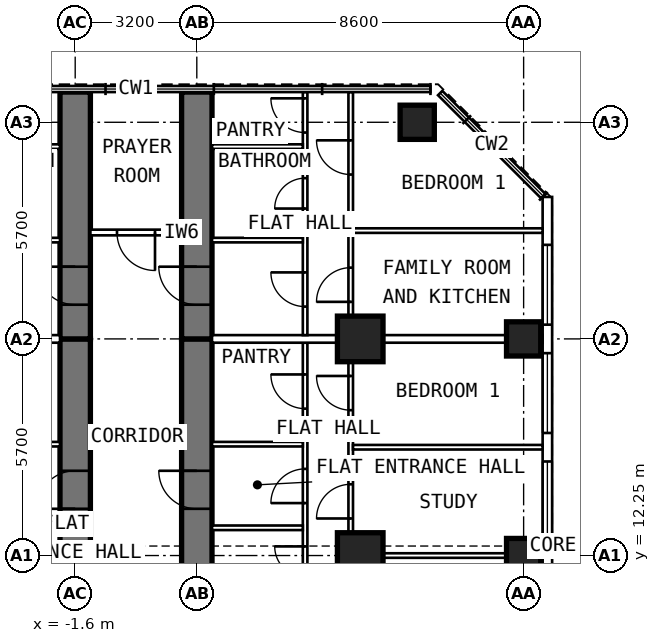
"""IFC4 building model, lengths in metres.
Left out: names, types, materials, properties, quantities, classifications, styles, units other than length and angle.
Written with IfcOpenShell. Run it as: python <this file> out.ifc"""

import sys

from ifc_helpers import new_model, si_unit, direction, frame, frame_2d, origin, origin_2d, place, context, subcontext, project, spatial, rectangle, extrude, element, fill, save


model = new_model("IFC4")
c1 = context("Model", 3, precision=1e-05, world=origin(), true_north=direction((0.0, 1.0)))
c2 = subcontext(c1, "Body", "Model", "MODEL_VIEW")
j1 = project(units=[si_unit("LENGTHUNIT", "METRE"), si_unit("PLANEANGLEUNIT", "RADIAN")], contexts=[c1])
p1 = place(None, origin())
s1 = spatial("IfcSite", under=j1, at=p1, CompositionType="ELEMENT")
p2 = place(p1, origin())
s2 = spatial("IfcBuilding", under=s1, at=p2, CompositionType="ELEMENT")
p3 = place(p2, frame((0.0, 0.0, 183.2)))
s3 = spatial("IfcBuildingStorey", under=s2, at=p3, CompositionType="ELEMENT", Elevation=183.2)
for number, where, z_axis, x_axis in (
    (1, (10.2, 12.25, 0.0), (0.0, 0.0, 1.0), (0.0, 1.0, 0.0)),
    (2, (10.2, 17.95, 0.0), (0.0, 0.0, 1.0), (0.0, 1.0, 0.0)),
    (3, (7.4, 23.65, 0.0), (0.0, 0.0, 1.0), (0.0, 1.0, 0.0)),
):
    element("IfcColumn", number, at=place(p3, frame(where, z_axis=z_axis, x_axis=x_axis)), inside=s3, PredefinedType="COLUMN", context=c2, shape_type="SweptSolid", body=[
        extrude(rectangle(XDim=0.9, YDim=0.9, at=origin_2d()), origin(), (0.0, 0.0, 1.0), 3.6),
    ])
for number, where, z_axis, x_axis in (
    (4, (5.9, 12.25, 0.0), (0.0, 0.0, 1.0), (0.0, 1.0, 0.0)),
    (5, (5.9, 17.95, 0.0), (0.0, 0.0, 1.0), (0.0, 1.0, 0.0)),
):
    element("IfcColumn", number, at=place(p3, frame(where, z_axis=z_axis, x_axis=x_axis)), inside=s3, PredefinedType="COLUMN", context=c2, shape_type="SweptSolid", body=[
        extrude(rectangle(XDim=1.2, YDim=1.2, at=origin_2d()), origin(), (0.0, 0.0, 1.0), 3.6),
    ])
p4 = place(p3, frame((-1.6, 9.6, 0.0), z_axis=(0.0, 0.0, 1.0), x_axis=(0.0, 1.0, 0.0)))
e6 = element("IfcWall", 6, at=p4, inside=s3, PredefinedType="SHEAR", context=c2, shape_type="SweptSolid", body=[
    extrude(rectangle(XDim=8.35, YDim=0.8, at=frame_2d((4.175, 0.0))), origin(), (0.0, 0.0, 1.0), 3.6),
])
p5 = place(p4, frame((3.88, 0.0, 0.0)))
e7 = element("IfcOpeningElement", 7, at=p5, cuts=e6, PredefinedType="OPENING", context=c2, shape_type="SweptSolid", body=[
    extrude(rectangle(XDim=1.0, YDim=2.1, at=frame_2d((0.5, 1.05))), frame((0.0, 0.412, 0.0), z_axis=(0.0, -1.0, 0.0), x_axis=(1.0, 0.0, 0.0)), (0.0, 0.0, 1.0), 0.824),
])
p6 = place(p3, frame((-1.6, 17.95, 0.0), z_axis=(0.0, 0.0, 1.0), x_axis=(0.0, 1.0, 0.0)))
e8 = element("IfcWall", 8, at=p6, inside=s3, PredefinedType="SHEAR", context=c2, shape_type="SweptSolid", body=[
    extrude(rectangle(XDim=6.495, YDim=0.8, at=frame_2d((3.248, 0.0))), origin(), (0.0, 0.0, 1.0), 3.6),
])
p7 = place(p6, frame((0.9, 0.0, 0.0)))
e9 = element("IfcOpeningElement", 9, at=p7, cuts=e8, PredefinedType="OPENING", context=c2, shape_type="SweptSolid", body=[
    extrude(rectangle(XDim=1.0, YDim=2.1, at=frame_2d((0.5, 1.05))), frame((0.0, 0.412, 0.0), z_axis=(0.0, -1.0, 0.0), x_axis=(1.0, 0.0, 0.0)), (0.0, 0.0, 1.0), 0.824),
])
p8 = place(p3, frame((1.6, 9.6, 0.0), z_axis=(0.0, 0.0, 1.0), x_axis=(0.0, 1.0, 0.0)))
e10 = element("IfcWall", 10, at=p8, inside=s3, PredefinedType="SHEAR", context=c2, shape_type="SweptSolid", body=[
    extrude(rectangle(XDim=8.35, YDim=0.8, at=frame_2d((4.175, 0.0))), origin(), (0.0, 0.0, 1.0), 3.6),
])
p9 = place(p8, frame((3.88, 0.0, 0.0)))
e11 = element("IfcOpeningElement", 11, at=p9, cuts=e10, PredefinedType="OPENING", context=c2, shape_type="SweptSolid", body=[
    extrude(rectangle(XDim=1.0, YDim=2.1, at=frame_2d((0.5, 1.05))), frame((0.0, 0.412, 0.0), z_axis=(0.0, -1.0, 0.0), x_axis=(1.0, 0.0, 0.0)), (0.0, 0.0, 1.0), 0.824),
])
p10 = place(p3, frame((1.6, 17.95, 0.0), z_axis=(0.0, 0.0, 1.0), x_axis=(0.0, 1.0, 0.0)))
e12 = element("IfcWall", 12, at=p10, inside=s3, PredefinedType="SHEAR", context=c2, shape_type="SweptSolid", body=[
    extrude(rectangle(XDim=6.495, YDim=0.8, at=frame_2d((3.248, 0.0))), origin(), (0.0, 0.0, 1.0), 3.6),
])
p11 = place(p10, frame((0.9, 0.0, 0.0)))
e13 = element("IfcOpeningElement", 13, at=p11, cuts=e12, PredefinedType="OPENING", context=c2, shape_type="SweptSolid", body=[
    extrude(rectangle(XDim=1.0, YDim=2.1, at=frame_2d((0.5, 1.05))), frame((0.0, 0.412, 0.0), z_axis=(0.0, -1.0, 0.0), x_axis=(1.0, 0.0, 0.0)), (0.0, 0.0, 1.0), 0.824),
])
p12 = place(p3, frame((10.825, 6.409, 0.0), z_axis=(0.0, 0.0, 1.0), x_axis=(0.0, 1.0, 0.0)))
e14 = element("IfcWall", 14, at=p12, inside=s3, PredefinedType="SOLIDWALL", context=c2, shape_type="SweptSolid", body=[
    extrude(rectangle(XDim=15.276, YDim=0.25, at=frame_2d((7.638, 0.0))), origin(), (0.0, 0.0, 1.0), 3.3),
])
p13 = place(p12, frame((0.516, 0.0, 0.8)))
e15 = element("IfcOpeningElement", 15, at=p13, cuts=e14, PredefinedType="OPENING", context=c2, shape_type="SweptSolid", body=[
    extrude(rectangle(XDim=2.1, YDim=1.8, at=frame_2d((1.05, 0.9))), frame((0.0, 0.137, 0.0), z_axis=(0.0, -1.0, 0.0), x_axis=(1.0, 0.0, 0.0)), (0.0, 0.0, 1.0), 0.274),
])
p14 = place(p12, frame((3.366, 0.0, 0.8)))
e16 = element("IfcOpeningElement", 16, at=p14, cuts=e14, PredefinedType="OPENING", context=c2, shape_type="SweptSolid", body=[
    extrude(rectangle(XDim=2.1, YDim=1.8, at=frame_2d((1.05, 0.9))), frame((0.0, 0.137, 0.0), z_axis=(0.0, -1.0, 0.0), x_axis=(1.0, 0.0, 0.0)), (0.0, 0.0, 1.0), 0.274),
])
p15 = place(p12, frame((6.216, 0.0, 0.8)))
e17 = element("IfcOpeningElement", 17, at=p15, cuts=e14, PredefinedType="OPENING", context=c2, shape_type="SweptSolid", body=[
    extrude(rectangle(XDim=2.1, YDim=1.8, at=frame_2d((1.05, 0.9))), frame((0.0, 0.137, 0.0), z_axis=(0.0, -1.0, 0.0), x_axis=(1.0, 0.0, 0.0)), (0.0, 0.0, 1.0), 0.274),
])
p16 = place(p12, frame((9.066, 0.0, 0.8)))
e18 = element("IfcOpeningElement", 18, at=p16, cuts=e14, PredefinedType="OPENING", context=c2, shape_type="SweptSolid", body=[
    extrude(rectangle(XDim=2.1, YDim=1.8, at=frame_2d((1.05, 0.9))), frame((0.0, 0.137, 0.0), z_axis=(0.0, -1.0, 0.0), x_axis=(1.0, 0.0, 0.0)), (0.0, 0.0, 1.0), 0.274),
])
p17 = place(p12, frame((11.916, 0.0, 0.8)))
e19 = element("IfcOpeningElement", 19, at=p17, cuts=e14, PredefinedType="OPENING", context=c2, shape_type="SweptSolid", body=[
    extrude(rectangle(XDim=2.1, YDim=1.8, at=frame_2d((1.05, 0.9))), frame((0.0, 0.137, 0.0), z_axis=(0.0, -1.0, 0.0), x_axis=(1.0, 0.0, 0.0)), (0.0, 0.0, 1.0), 0.274),
])
for number, where, z_axis, x_axis in (
    (20, (-2.0, 12.98, 0.0), (0.0, 0.0, 1.0), (-1.0, 0.0, 0.0)),
    (21, (-2.0, 15.18, 0.0), (0.0, 0.0, 1.0), (-1.0, 0.0, 0.0)),
    (22, (-2.0, 20.55, 0.0), (0.0, 0.0, 1.0), (-1.0, 0.0, 0.0)),
    (23, (-2.0, 23.01, 0.0), (0.0, 0.0, 1.0), (-1.0, 0.0, 0.0)),
):
    element("IfcWall", number, at=place(p3, frame(where, z_axis=z_axis, x_axis=x_axis)), inside=s3, PredefinedType="PARTITIONING", context=c2, shape_type="SweptSolid", body=[
        extrude(rectangle(XDim=2.39, YDim=0.12, at=frame_2d((1.195, 0.0))), origin(), (0.0, 0.0, 1.0), 3.3),
    ])
p18 = place(p3, frame((-2.0, 17.95, 0.0), z_axis=(0.0, 0.0, 1.0), x_axis=(-1.0, 0.0, 0.0)))
e24 = element("IfcWall", 24, at=p18, inside=s3, PredefinedType="PARTITIONING", context=c2, shape_type="SweptSolid", body=[
    extrude(rectangle(XDim=8.7, YDim=0.2, at=frame_2d((4.35, 0.0))), origin(), (0.0, 0.0, 1.0), 3.3),
])
p19 = place(p3, frame((4.45, 10.05, 0.0), z_axis=(0.0, 0.0, 1.0), x_axis=(0.0, 1.0, 0.0)))
e25 = element("IfcWall", 25, at=p19, inside=s3, PredefinedType="PARTITIONING", context=c2, shape_type="SweptSolid", body=[
    extrude(rectangle(XDim=7.8, YDim=0.12, at=frame_2d((3.9, 0.0))), origin(), (0.0, 0.0, 1.0), 3.3),
])
p20 = place(p19, frame((1.64, 0.0, 0.0)))
e26 = element("IfcOpeningElement", 26, at=p20, cuts=e25, PredefinedType="OPENING", context=c2, shape_type="SweptSolid", body=[
    extrude(rectangle(XDim=0.8, YDim=2.1, at=frame_2d((0.4, 1.05))), frame((0.0, 0.072, 0.0), z_axis=(0.0, -1.0, 0.0), x_axis=(1.0, 0.0, 0.0)), (0.0, 0.0, 1.0), 0.144),
])
p21 = place(p19, frame((3.58, 0.0, 0.0)))
e27 = element("IfcOpeningElement", 27, at=p21, cuts=e25, PredefinedType="OPENING", context=c2, shape_type="SweptSolid", body=[
    extrude(rectangle(XDim=0.9, YDim=2.1, at=frame_2d((0.45, 1.05))), frame((0.0, 0.072, 0.0), z_axis=(0.0, -1.0, 0.0), x_axis=(1.0, 0.0, 0.0)), (0.0, 0.0, 1.0), 0.144),
])
p22 = place(p19, frame((6.065, 0.0, 0.0)))
e28 = element("IfcOpeningElement", 28, at=p22, cuts=e25, PredefinedType="OPENING", context=c2, shape_type="SweptSolid", body=[
    extrude(rectangle(XDim=0.9, YDim=2.1, at=frame_2d((0.45, 1.05))), frame((0.0, 0.072, 0.0), z_axis=(0.0, -1.0, 0.0), x_axis=(1.0, 0.0, 0.0)), (0.0, 0.0, 1.0), 0.144),
])
p23 = place(p3, frame((5.65, 9.6, 0.0), z_axis=(0.0, 0.0, 1.0), x_axis=(0.0, 1.0, 0.0)))
e29 = element("IfcWall", 29, at=p23, inside=s3, PredefinedType="PARTITIONING", context=c2, shape_type="SweptSolid", body=[
    extrude(rectangle(XDim=8.1, YDim=0.12, at=frame_2d((4.05, 0.0))), origin(), (0.0, 0.0, 1.0), 3.3),
])
p24 = place(p23, frame((1.0, 0.0, 0.0)))
e30 = element("IfcOpeningElement", 30, at=p24, cuts=e29, PredefinedType="OPENING", context=c2, shape_type="SweptSolid", body=[
    extrude(rectangle(XDim=0.9, YDim=2.1, at=frame_2d((0.45, 1.05))), frame((0.0, 0.072, 0.0), z_axis=(0.0, -1.0, 0.0), x_axis=(1.0, 0.0, 0.0)), (0.0, 0.0, 1.0), 0.144),
])
p25 = place(p23, frame((3.625, 0.0, 0.0)))
e31 = element("IfcOpeningElement", 31, at=p25, cuts=e29, PredefinedType="OPENING", context=c2, shape_type="SweptSolid", body=[
    extrude(rectangle(XDim=0.9, YDim=2.1, at=frame_2d((0.45, 1.05))), frame((0.0, 0.072, 0.0), z_axis=(0.0, -1.0, 0.0), x_axis=(1.0, 0.0, 0.0)), (0.0, 0.0, 1.0), 0.144),
])
p26 = place(p23, frame((6.475, 0.0, 0.0)))
e32 = element("IfcOpeningElement", 32, at=p26, cuts=e29, PredefinedType="OPENING", context=c2, shape_type="SweptSolid", body=[
    extrude(rectangle(XDim=0.9, YDim=2.1, at=frame_2d((0.45, 1.05))), frame((0.0, 0.072, 0.0), z_axis=(0.0, -1.0, 0.0), x_axis=(1.0, 0.0, 0.0)), (0.0, 0.0, 1.0), 0.144),
])
p27 = place(p3, frame((5.71, 12.25, 0.0), z_axis=(0.0, 0.0, 1.0), x_axis=(1.0, 0.0, 0.0)))
e33 = element("IfcWall", 33, at=p27, inside=s3, PredefinedType="PARTITIONING", context=c2, shape_type="SweptSolid", body=[
    extrude(rectangle(XDim=4.99, YDim=0.12, at=frame_2d((2.495, 0.0))), origin(), (0.0, 0.0, 1.0), 2.3),
])
p28 = place(p3, frame((5.71, 15.1, 0.0), z_axis=(0.0, 0.0, 1.0), x_axis=(1.0, 0.0, 0.0)))
e34 = element("IfcWall", 34, at=p28, inside=s3, PredefinedType="PARTITIONING", context=c2, shape_type="SweptSolid", body=[
    extrude(rectangle(XDim=4.99, YDim=0.12, at=frame_2d((2.495, 0.0))), origin(), (0.0, 0.0, 1.0), 3.3),
])
for number, where, z_axis, x_axis in (
    (35, (2.0, 12.98, 0.0), (0.0, 0.0, 1.0), (1.0, 0.0, 0.0)),
    (36, (2.0, 15.18, 0.0), (0.0, 0.0, 1.0), (1.0, 0.0, 0.0)),
):
    element("IfcWall", number, at=place(p3, frame(where, z_axis=z_axis, x_axis=x_axis)), inside=s3, PredefinedType="PARTITIONING", context=c2, shape_type="SweptSolid", body=[
        extrude(rectangle(XDim=2.39, YDim=0.12, at=frame_2d((1.195, 0.0))), origin(), (0.0, 0.0, 1.0), 3.3),
    ])
p29 = place(p3, frame((4.45, 18.05, 0.0), z_axis=(0.0, 0.0, 1.0), x_axis=(0.0, 1.0, 0.0)))
e37 = element("IfcWall", 37, at=p29, inside=s3, PredefinedType="PARTITIONING", context=c2, shape_type="SweptSolid", body=[
    extrude(rectangle(XDim=6.395, YDim=0.12, at=frame_2d((3.198, 0.0))), origin(), (0.0, 0.0, 1.0), 3.3),
])
p30 = place(p29, frame((0.75, 0.0, 0.0)))
e38 = element("IfcOpeningElement", 38, at=p30, cuts=e37, PredefinedType="OPENING", context=c2, shape_type="SweptSolid", body=[
    extrude(rectangle(XDim=0.9, YDim=2.1, at=frame_2d((0.45, 1.05))), frame((0.0, 0.072, 0.0), z_axis=(0.0, -1.0, 0.0), x_axis=(1.0, 0.0, 0.0)), (0.0, 0.0, 1.0), 0.144),
])
p31 = place(p29, frame((3.33, 0.0, 0.0)))
e39 = element("IfcOpeningElement", 39, at=p31, cuts=e37, PredefinedType="OPENING", context=c2, shape_type="SweptSolid", body=[
    extrude(rectangle(XDim=0.8, YDim=2.1, at=frame_2d((0.4, 1.05))), frame((0.0, 0.072, 0.0), z_axis=(0.0, -1.0, 0.0), x_axis=(1.0, 0.0, 0.0)), (0.0, 0.0, 1.0), 0.144),
])
p32 = place(p29, frame((5.33, 0.0, 0.0)))
e40 = element("IfcOpeningElement", 40, at=p32, cuts=e37, PredefinedType="OPENING", context=c2, shape_type="SweptSolid", body=[
    extrude(rectangle(XDim=0.9, YDim=2.1, at=frame_2d((0.45, 1.05))), frame((0.0, 0.072, 0.0), z_axis=(0.0, -1.0, 0.0), x_axis=(1.0, 0.0, 0.0)), (0.0, 0.0, 1.0), 0.144),
])
p33 = place(p3, frame((5.65, 18.05, 0.0), z_axis=(0.0, 0.0, 1.0), x_axis=(0.0, 1.0, 0.0)))
e41 = element("IfcWall", 41, at=p33, inside=s3, PredefinedType="PARTITIONING", context=c2, shape_type="SweptSolid", body=[
    extrude(rectangle(XDim=6.395, YDim=0.12, at=frame_2d((3.198, 0.0))), origin(), (0.0, 0.0, 1.0), 3.3),
])
p34 = place(p33, frame((0.875, 0.0, 0.0)))
e42 = element("IfcOpeningElement", 42, at=p34, cuts=e41, PredefinedType="OPENING", context=c2, shape_type="SweptSolid", body=[
    extrude(rectangle(XDim=0.9, YDim=2.1, at=frame_2d((0.45, 1.05))), frame((0.0, 0.072, 0.0), z_axis=(0.0, -1.0, 0.0), x_axis=(1.0, 0.0, 0.0)), (0.0, 0.0, 1.0), 0.144),
])
p35 = place(p33, frame((4.225, 0.0, 0.0)))
e43 = element("IfcOpeningElement", 43, at=p35, cuts=e41, PredefinedType="OPENING", context=c2, shape_type="SweptSolid", body=[
    extrude(rectangle(XDim=0.9, YDim=2.1, at=frame_2d((0.45, 1.05))), frame((0.0, 0.072, 0.0), z_axis=(0.0, -1.0, 0.0), x_axis=(1.0, 0.0, 0.0)), (0.0, 0.0, 1.0), 0.144),
])
p36 = place(p3, frame((5.71, 20.8, 0.0), z_axis=(0.0, 0.0, 1.0), x_axis=(1.0, 0.0, 0.0)))
e44 = element("IfcWall", 44, at=p36, inside=s3, PredefinedType="PARTITIONING", context=c2, shape_type="SweptSolid", body=[
    extrude(rectangle(XDim=4.99, YDim=0.12, at=frame_2d((2.495, 0.0))), origin(), (0.0, 0.0, 1.0), 3.3),
])
for number, where, z_axis, x_axis in (
    (45, (2.0, 20.55, 0.0), (0.0, 0.0, 1.0), (1.0, 0.0, 0.0)),
    (46, (2.0, 23.01, 0.0), (0.0, 0.0, 1.0), (1.0, 0.0, 0.0)),
):
    element("IfcWall", number, at=place(p3, frame(where, z_axis=z_axis, x_axis=x_axis)), inside=s3, PredefinedType="PARTITIONING", context=c2, shape_type="SweptSolid", body=[
        extrude(rectangle(XDim=2.39, YDim=0.12, at=frame_2d((1.195, 0.0))), origin(), (0.0, 0.0, 1.0), 3.3),
    ])
p37 = place(p3, frame((2.0, 17.95, 0.0), z_axis=(0.0, 0.0, 1.0), x_axis=(1.0, 0.0, 0.0)))
e47 = element("IfcWall", 47, at=p37, inside=s3, PredefinedType="PARTITIONING", context=c2, shape_type="SweptSolid", body=[
    extrude(rectangle(XDim=8.7, YDim=0.2, at=frame_2d((4.35, 0.0))), origin(), (0.0, 0.0, 1.0), 3.3),
])
p38 = place(p3, frame((1.2, 20.75, 0.0), z_axis=(0.0, 0.0, 1.0), x_axis=(-1.0, 0.0, 0.0)))
e48 = element("IfcWall", 48, at=p38, inside=s3, PredefinedType="PARTITIONING", context=c2, shape_type="SweptSolid", body=[
    extrude(rectangle(XDim=2.4, YDim=0.15, at=frame_2d((1.2, 0.0))), origin(), (0.0, 0.0, 1.0), 3.3),
])
p39 = place(p38, frame((0.7, 0.0, 0.0)))
e49 = element("IfcOpeningElement", 49, at=p39, cuts=e48, PredefinedType="OPENING", context=c2, shape_type="SweptSolid", body=[
    extrude(rectangle(XDim=1.0, YDim=2.1, at=frame_2d((0.5, 1.05))), frame((0.0, 0.087, 0.0), z_axis=(0.0, -1.0, 0.0), x_axis=(1.0, 0.0, 0.0)), (0.0, 0.0, 1.0), 0.174),
])
p40 = place(p15, origin())
e50 = element("IfcWindow", 50, at=p40, inside=s3, PartitioningType="SINGLE_PANEL", PredefinedType="WINDOW", context=c2, shape_type="SweptSolid", body=[
    extrude(rectangle(XDim=2.1, YDim=1.8, at=frame_2d((1.05, 0.9))), frame((0.0, 0.03, 0.0), z_axis=(0.0, -1.0, 0.0), x_axis=(1.0, 0.0, 0.0)), (0.0, 0.0, 1.0), 0.06),
])
fill(e17, e50)
p41 = place(p16, origin())
e51 = element("IfcWindow", 51, at=p41, inside=s3, PartitioningType="SINGLE_PANEL", PredefinedType="WINDOW", context=c2, shape_type="SweptSolid", body=[
    extrude(rectangle(XDim=2.1, YDim=1.8, at=frame_2d((1.05, 0.9))), frame((0.0, 0.03, 0.0), z_axis=(0.0, -1.0, 0.0), x_axis=(1.0, 0.0, 0.0)), (0.0, 0.0, 1.0), 0.06),
])
fill(e18, e51)
p42 = place(p17, origin())
e52 = element("IfcWindow", 52, at=p42, inside=s3, PartitioningType="SINGLE_PANEL", PredefinedType="WINDOW", context=c2, shape_type="SweptSolid", body=[
    extrude(rectangle(XDim=2.1, YDim=1.8, at=frame_2d((1.05, 0.9))), frame((0.0, 0.03, 0.0), z_axis=(0.0, -1.0, 0.0), x_axis=(1.0, 0.0, 0.0)), (0.0, 0.0, 1.0), 0.06),
])
fill(e19, e52)
p43 = place(p5, origin())
e53 = element("IfcDoor", 53, at=p43, inside=s3, OperationType="SINGLE_SWING_LEFT", PredefinedType="DOOR", context=c2, shape_type="SweptSolid", body=[
    extrude(rectangle(XDim=1.0, YDim=2.1, at=frame_2d((0.5, 1.05))), frame((0.0, 0.15, 0.0), z_axis=(0.0, -1.0, 0.0), x_axis=(1.0, 0.0, 0.0)), (0.0, 0.0, 1.0), 0.3),
])
fill(e7, e53)
p44 = place(p7, origin())
e54 = element("IfcDoor", 54, at=p44, inside=s3, OperationType="SINGLE_SWING_RIGHT", PredefinedType="DOOR", context=c2, shape_type="SweptSolid", body=[
    extrude(rectangle(XDim=1.0, YDim=2.1, at=frame_2d((0.5, 1.05))), frame((0.0, 0.15, 0.0), z_axis=(0.0, -1.0, 0.0), x_axis=(1.0, 0.0, 0.0)), (0.0, 0.0, 1.0), 0.3),
])
fill(e9, e54)
p45 = place(p9, origin())
e55 = element("IfcDoor", 55, at=p45, inside=s3, OperationType="SINGLE_SWING_RIGHT", PredefinedType="DOOR", context=c2, shape_type="SweptSolid", body=[
    extrude(rectangle(XDim=1.0, YDim=2.1, at=frame_2d((0.5, 1.05))), frame((0.0, 0.15, 0.0), z_axis=(0.0, -1.0, 0.0), x_axis=(1.0, 0.0, 0.0)), (0.0, 0.0, 1.0), 0.3),
])
fill(e11, e55)
p46 = place(p25, origin())
e56 = element("IfcDoor", 56, at=p46, inside=s3, OperationType="SINGLE_SWING_LEFT", PredefinedType="DOOR", context=c2, shape_type="SweptSolid", body=[
    extrude(rectangle(XDim=0.9, YDim=2.1, at=frame_2d((0.45, 1.05))), frame((0.0, 0.025, 0.0), z_axis=(0.0, -1.0, 0.0), x_axis=(1.0, 0.0, 0.0)), (0.0, 0.0, 1.0), 0.05),
])
fill(e31, e56)
p47 = place(p26, origin())
e57 = element("IfcDoor", 57, at=p47, inside=s3, OperationType="SINGLE_SWING_RIGHT", PredefinedType="DOOR", context=c2, shape_type="SweptSolid", body=[
    extrude(rectangle(XDim=0.9, YDim=2.1, at=frame_2d((0.45, 1.05))), frame((0.0, 0.025, 0.0), z_axis=(0.0, -1.0, 0.0), x_axis=(1.0, 0.0, 0.0)), (0.0, 0.0, 1.0), 0.05),
])
fill(e32, e57)
p48 = place(p20, origin())
e58 = element("IfcDoor", 58, at=p48, inside=s3, OperationType="SINGLE_SWING_RIGHT", PredefinedType="DOOR", context=c2, shape_type="SweptSolid", body=[
    extrude(rectangle(XDim=0.8, YDim=2.1, at=frame_2d((0.4, 1.05))), frame((0.0, 0.025, 0.0), z_axis=(0.0, -1.0, 0.0), x_axis=(1.0, 0.0, 0.0)), (0.0, 0.0, 1.0), 0.05),
])
fill(e26, e58)
p49 = place(p21, origin())
e59 = element("IfcDoor", 59, at=p49, inside=s3, OperationType="SINGLE_SWING_LEFT", PredefinedType="DOOR", context=c2, shape_type="SweptSolid", body=[
    extrude(rectangle(XDim=0.9, YDim=2.1, at=frame_2d((0.45, 1.05))), frame((0.0, 0.025, 0.0), z_axis=(0.0, -1.0, 0.0), x_axis=(1.0, 0.0, 0.0)), (0.0, 0.0, 1.0), 0.05),
])
fill(e27, e59)
p50 = place(p22, origin())
e60 = element("IfcDoor", 60, at=p50, inside=s3, OperationType="SINGLE_SWING_RIGHT", PredefinedType="DOOR", context=c2, shape_type="SweptSolid", body=[
    extrude(rectangle(XDim=0.9, YDim=2.1, at=frame_2d((0.45, 1.05))), frame((0.0, 0.025, 0.0), z_axis=(0.0, -1.0, 0.0), x_axis=(1.0, 0.0, 0.0)), (0.0, 0.0, 1.0), 0.05),
])
fill(e28, e60)
p51 = place(p11, origin())
e61 = element("IfcDoor", 61, at=p51, inside=s3, OperationType="SINGLE_SWING_RIGHT", PredefinedType="DOOR", context=c2, shape_type="SweptSolid", body=[
    extrude(rectangle(XDim=1.0, YDim=2.1, at=frame_2d((0.5, 1.05))), frame((0.0, 0.15, 0.0), z_axis=(0.0, -1.0, 0.0), x_axis=(1.0, 0.0, 0.0)), (0.0, 0.0, 1.0), 0.3),
])
fill(e13, e61)
p52 = place(p34, origin())
e62 = element("IfcDoor", 62, at=p52, inside=s3, OperationType="SINGLE_SWING_LEFT", PredefinedType="DOOR", context=c2, shape_type="SweptSolid", body=[
    extrude(rectangle(XDim=0.9, YDim=2.1, at=frame_2d((0.45, 1.05))), frame((0.0, 0.025, 0.0), z_axis=(0.0, -1.0, 0.0), x_axis=(1.0, 0.0, 0.0)), (0.0, 0.0, 1.0), 0.05),
])
fill(e42, e62)
p53 = place(p35, origin())
e63 = element("IfcDoor", 63, at=p53, inside=s3, OperationType="SINGLE_SWING_RIGHT", PredefinedType="DOOR", context=c2, shape_type="SweptSolid", body=[
    extrude(rectangle(XDim=0.9, YDim=2.1, at=frame_2d((0.45, 1.05))), frame((0.0, 0.025, 0.0), z_axis=(0.0, -1.0, 0.0), x_axis=(1.0, 0.0, 0.0)), (0.0, 0.0, 1.0), 0.05),
])
fill(e43, e63)
p54 = place(p30, origin())
e64 = element("IfcDoor", 64, at=p54, inside=s3, OperationType="SINGLE_SWING_RIGHT", PredefinedType="DOOR", context=c2, shape_type="SweptSolid", body=[
    extrude(rectangle(XDim=0.9, YDim=2.1, at=frame_2d((0.45, 1.05))), frame((0.0, 0.025, 0.0), z_axis=(0.0, -1.0, 0.0), x_axis=(1.0, 0.0, 0.0)), (0.0, 0.0, 1.0), 0.05),
])
fill(e38, e64)
p55 = place(p31, origin())
e65 = element("IfcDoor", 65, at=p55, inside=s3, OperationType="SINGLE_SWING_LEFT", PredefinedType="DOOR", context=c2, shape_type="SweptSolid", body=[
    extrude(rectangle(XDim=0.8, YDim=2.1, at=frame_2d((0.4, 1.05))), frame((0.0, 0.025, 0.0), z_axis=(0.0, -1.0, 0.0), x_axis=(1.0, 0.0, 0.0)), (0.0, 0.0, 1.0), 0.05),
])
fill(e39, e65)
p56 = place(p32, origin())
e66 = element("IfcDoor", 66, at=p56, inside=s3, OperationType="SINGLE_SWING_RIGHT", PredefinedType="DOOR", context=c2, shape_type="SweptSolid", body=[
    extrude(rectangle(XDim=0.9, YDim=2.1, at=frame_2d((0.45, 1.05))), frame((0.0, 0.025, 0.0), z_axis=(0.0, -1.0, 0.0), x_axis=(1.0, 0.0, 0.0)), (0.0, 0.0, 1.0), 0.05),
])
fill(e40, e66)
p57 = place(p39, origin())
e67 = element("IfcDoor", 67, at=p57, inside=s3, OperationType="SINGLE_SWING_LEFT", PredefinedType="DOOR", context=c2, shape_type="SweptSolid", body=[
    extrude(rectangle(XDim=1.0, YDim=2.1, at=frame_2d((0.5, 1.05))), frame((0.0, 0.025, 0.0), z_axis=(0.0, -1.0, 0.0), x_axis=(1.0, 0.0, 0.0)), (0.0, 0.0, 1.0), 0.05),
])
fill(e49, e67)
save(model, sys.argv[1])
